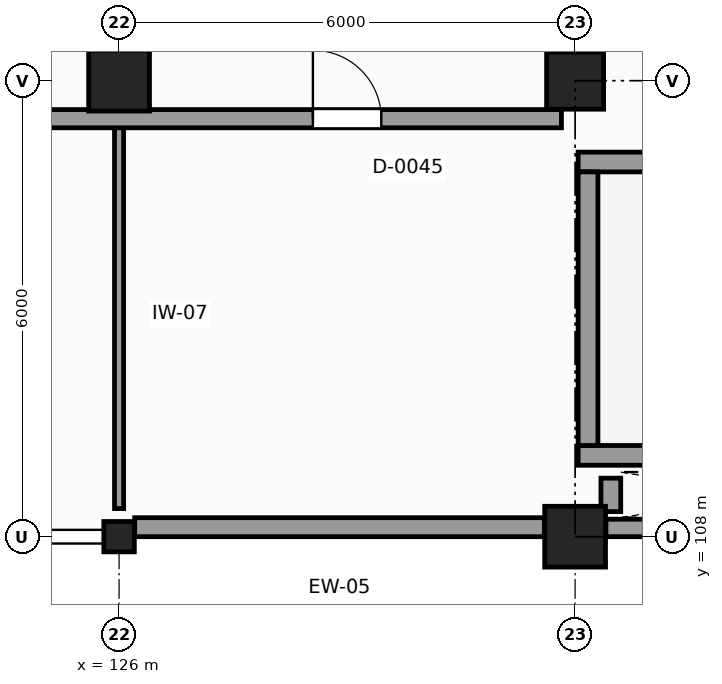
"""IFC4 building model, lengths in metres.
Left out: names, types, materials, properties, quantities, classifications, styles, units other than length and angle.
Written with IfcOpenShell. Run it as: python <this file> out.ifc"""

import sys

from ifc_helpers import new_model, si_unit, direction, frame, frame_2d, origin, origin_2d, place, context, subcontext, project, spatial, rectangle, i_section, extrude, element, fill, save


model = new_model("IFC4")
c1 = context("Model", 3, precision=1e-05, world=origin(), true_north=direction((0.0, 1.0)))
c2 = subcontext(c1, "Body", "Model", "MODEL_VIEW")
j1 = project(units=[si_unit("LENGTHUNIT", "METRE"), si_unit("PLANEANGLEUNIT", "RADIAN")], contexts=[c1])
p1 = place(None, origin())
s1 = spatial("IfcSite", under=j1, at=p1, CompositionType="ELEMENT")
p2 = place(p1, origin())
s2 = spatial("IfcBuilding", under=s1, at=p2, CompositionType="ELEMENT")
p3 = place(p2, origin())
s3 = spatial("IfcBuildingStorey", under=s2, at=p3, CompositionType="ELEMENT", Elevation=0.0)
p4 = place(p3, frame((126.0, 108.0, 0.0), z_axis=(0.0, 0.0, 1.0), x_axis=(1.0, 0.0, 0.0)))
e1 = element("IfcColumn", 1, at=p4, inside=s3, PredefinedType="COLUMN", context=c2, shape_type="SweptSolid", body=[
    extrude(i_section(OverallWidth=0.401, OverallDepth=0.399, WebThickness=0.019, FlangeThickness=0.03, FilletRadius=0.015, at=origin_2d()), origin(), (0.0, 0.0, 1.0), 6.0),
])
for number, where, z_axis, x_axis in (
    (2, (126.0, 114.0, 0.0), (0.0, 0.0, 1.0), (1.0, 0.0, 0.0)),
    (3, (132.0, 108.0, 0.0), (0.0, 0.0, 1.0), (1.0, 0.0, 0.0)),
):
    element("IfcColumn", number, at=place(p3, frame(where, z_axis=z_axis, x_axis=x_axis)), inside=s3, PredefinedType="COLUMN", context=c2, shape_type="SweptSolid", body=[
        extrude(rectangle(XDim=0.8, YDim=0.8, at=origin_2d()), origin(), (0.0, 0.0, 1.0), 6.0),
    ])
p5 = place(p3, frame((132.0, 114.0, 0.0), z_axis=(0.0, 0.0, 1.0), x_axis=(1.0, 0.0, 0.0)))
e4 = element("IfcColumn", 4, at=p5, inside=s3, PredefinedType="COLUMN", context=c2, shape_type="SweptSolid", body=[
    extrude(rectangle(XDim=0.75, YDim=0.75, at=origin_2d()), origin(), (0.0, 0.0, 1.0), 6.0),
])
p6 = place(p3, frame((126.206, 108.125, 0.0), z_axis=(0.0, 0.0, 1.0), x_axis=(1.0, 0.0, 0.0)))
e5 = element("IfcWall", 5, at=p6, inside=s3, PredefinedType="SOLIDWALL", context=c2, shape_type="SweptSolid", body=[
    extrude(rectangle(XDim=5.389, YDim=0.25, at=frame_2d((2.695, 0.0))), origin(), (0.0, 0.0, 1.0), 4.99),
])
p7 = place(p3, frame((132.405, 108.115, 0.0), z_axis=(0.0, 0.0, 1.0), x_axis=(1.0, 0.0, 0.0)))
e6 = element("IfcWall", 6, at=p7, inside=s3, PredefinedType="SOLIDWALL", context=c2, shape_type="SweptSolid", body=[
    extrude(rectangle(XDim=5.215, YDim=0.23, at=frame_2d((2.607, 0.0))), origin(), (0.0, 0.0, 1.0), 5.74),
])
for number, where, z_axis, x_axis in (
    (7, (132.04, 109.07, 0.0), (0.0, 0.0, 1.0), (1.0, 0.0, 0.0)),
    (8, (132.04, 112.93, 0.0), (0.0, 0.0, 1.0), (1.0, 0.0, 0.0)),
):
    element("IfcWall", number, at=place(p3, frame(where, z_axis=z_axis, x_axis=x_axis)), inside=s3, PredefinedType="SHEAR", context=c2, shape_type="SweptSolid", body=[
        extrude(rectangle(XDim=10.72, YDim=0.26, at=frame_2d((5.36, 0.0))), origin(), (0.0, 0.0, 1.0), 6.0),
    ])
p8 = place(p3, frame((132.17, 109.2, 0.0), z_axis=(0.0, 0.0, 1.0), x_axis=(0.0, 1.0, 0.0)))
e9 = element("IfcWall", 9, at=p8, inside=s3, PredefinedType="SHEAR", context=c2, shape_type="SweptSolid", body=[
    extrude(rectangle(XDim=3.6, YDim=0.26, at=frame_2d((1.8, 0.0))), origin(), (0.0, 0.0, 1.0), 6.0),
])
p9 = place(p3, frame((132.47, 108.33, 0.0), z_axis=(0.0, 0.0, 1.0), x_axis=(0.0, 1.0, 0.0)))
e10 = element("IfcWall", 10, at=p9, inside=s3, PredefinedType="SHEAR", context=c2, shape_type="SweptSolid", body=[
    extrude(rectangle(XDim=0.44, YDim=0.26, at=frame_2d((0.22, 0.0))), origin(), (0.0, 0.0, 1.0), 6.0),
])
p10 = place(p3, frame((126.0, 108.37, 0.0), z_axis=(0.0, 0.0, 1.0), x_axis=(0.0, 1.0, 0.0)))
e11 = element("IfcWall", 11, at=p10, inside=s3, PredefinedType="PARTITIONING", context=c2, shape_type="SweptSolid", body=[
    extrude(rectangle(XDim=5.13, YDim=0.12, at=frame_2d((2.565, 0.0))), origin(), (0.0, 0.0, 1.0), 5.4),
])
p11 = place(p3, frame((120.605, 113.5, 0.0), z_axis=(0.0, 0.0, 1.0), x_axis=(1.0, 0.0, 0.0)))
e12 = element("IfcWall", 12, at=p11, inside=s3, PredefinedType="PARTITIONING", context=c2, shape_type="SweptSolid", body=[
    extrude(rectangle(XDim=11.215, YDim=0.24, at=frame_2d((5.607, 0.0))), origin(), (0.0, 0.0, 1.0), 5.74),
])
p12 = place(p11, frame((1.945, 0.0, 0.0)))
e13 = element("IfcOpeningElement", 13, at=p12, cuts=e12, PredefinedType="OPENING", context=c2, shape_type="SweptSolid", body=[
    extrude(rectangle(XDim=0.9, YDim=2.1, at=frame_2d((0.45, 1.05))), frame((0.0, 0.13, 0.0), z_axis=(0.0, -1.0, 0.0), x_axis=(1.0, 0.0, 0.0)), (0.0, 0.0, 1.0), 0.26),
])
p13 = place(p11, frame((7.945, 0.0, 0.0)))
e14 = element("IfcOpeningElement", 14, at=p13, cuts=e12, PredefinedType="OPENING", context=c2, shape_type="SweptSolid", body=[
    extrude(rectangle(XDim=0.9, YDim=2.1, at=frame_2d((0.45, 1.05))), frame((0.0, 0.13, 0.0), z_axis=(0.0, -1.0, 0.0), x_axis=(1.0, 0.0, 0.0)), (0.0, 0.0, 1.0), 0.26),
])
p14 = place(p13, origin())
e15 = element("IfcDoor", 15, at=p14, inside=s3, OperationType="SINGLE_SWING_LEFT", PredefinedType="DOOR", context=c2, shape_type="SweptSolid", body=[
    extrude(rectangle(XDim=0.9, YDim=2.1, at=frame_2d((0.45, 1.05))), frame((0.0, 0.025, 0.0), z_axis=(0.0, -1.0, 0.0), x_axis=(1.0, 0.0, 0.0)), (0.0, 0.0, 1.0), 0.05),
])
fill(e14, e15)
save(model, sys.argv[1])
